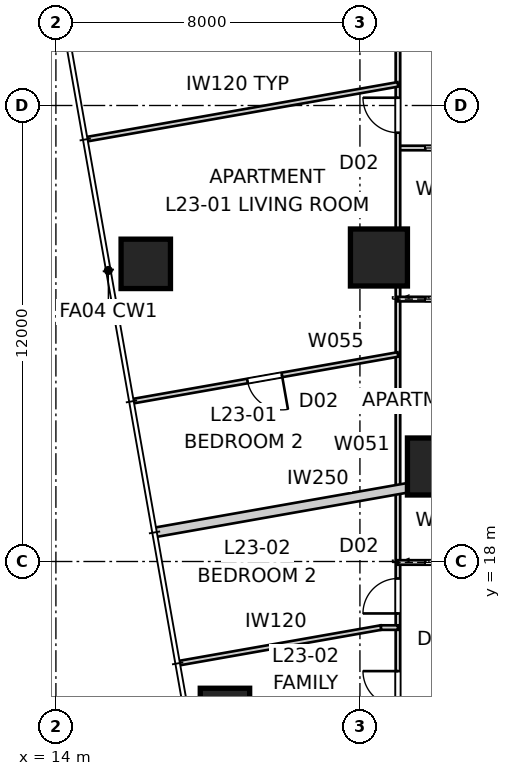
"""IFC4 building model, lengths in metres.
Left out: names, types, materials, properties, quantities, classifications, styles, units other than length and angle.
Written with IfcOpenShell. Run it as: python <this file> out.ifc"""

import sys

from ifc_helpers import new_model, si_unit, direction, frame, frame_2d, origin, origin_2d, place, context, subcontext, project, spatial, rectangle, extrude, element, fill, save


model = new_model("IFC4")
c1 = context("Model", 3, precision=1e-05, world=origin(), true_north=direction((0.0, 1.0)))
c2 = subcontext(c1, "Body", "Model", "MODEL_VIEW")
j1 = project(units=[si_unit("LENGTHUNIT", "METRE"), si_unit("PLANEANGLEUNIT", "RADIAN")], contexts=[c1])
p1 = place(None, origin())
s1 = spatial("IfcSite", under=j1, at=p1, CompositionType="ELEMENT")
p2 = place(p1, origin())
s2 = spatial("IfcBuilding", under=s1, at=p2, CompositionType="ELEMENT")
p3 = place(p2, frame((0.0, 0.0, 86.2)))
s3 = spatial("IfcBuildingStorey", under=s2, at=p3, CompositionType="ELEMENT", Elevation=86.2)
for number, where, z_axis, x_axis in (
    (1, (16.365, 25.833, 0.0), (0.0, 0.0, 1.0), (1.0, 0.0, 0.0)),
    (2, (18.448, 14.015, 0.0), (0.0, 0.0, 1.0), (1.0, 0.0, 0.0)),
):
    element("IfcColumn", number, at=place(p3, frame(where, z_axis=z_axis, x_axis=x_axis)), inside=s3, PredefinedType="COLUMN", context=c2, shape_type="SweptSolid", body=[
        extrude(rectangle(XDim=1.3, YDim=1.3, at=origin_2d()), origin(), (0.0, 0.0, 1.0), 3.4),
    ])
for number, where, z_axis, x_axis in (
    (3, (22.5, 26.0, 0.0), (0.0, 0.0, 1.0), (1.0, 0.0, 0.0)),
    (4, (24.0, 20.5, 0.0), (0.0, 0.0, 1.0), (1.0, 0.0, 0.0)),
):
    element("IfcColumn", number, at=place(p3, frame(where, z_axis=z_axis, x_axis=x_axis)), inside=s3, PredefinedType="COLUMN", context=c2, shape_type="SweptSolid", body=[
        extrude(rectangle(XDim=1.5, YDim=1.5, at=origin_2d()), origin(), (0.0, 0.0, 1.0), 3.4),
    ])
p4 = place(p3, frame((16.595, 18.765, 0.0), z_axis=(0.0, 0.0, 1.0), x_axis=(0.984806596137, 0.173654738504, 0.0)))
e5 = element("IfcWall", 5, at=p4, inside=s3, PredefinedType="PARTITIONING", context=c2, shape_type="SweptSolid", body=[
    extrude(rectangle(XDim=8.958, YDim=0.25, at=frame_2d((4.479, 0.0))), origin(), (0.0, 0.0, 1.0), 3.25),
])
p5 = place(p3, frame((25.4, 28.882, 0.0), z_axis=(0.0, 0.0, 1.0), x_axis=(-1.0, 0.0, 0.0)))
e6 = element("IfcWall", 6, at=p5, inside=s3, PredefinedType="PARTITIONING", context=c2, shape_type="SweptSolid", body=[
    extrude(rectangle(XDim=2.4, YDim=0.12, at=frame_2d((1.2, 0.0))), origin(), (0.0, 0.0, 1.0), 3.25),
])
p6 = place(p5, frame((0.72, 0.0, 0.0)))
e7 = element("IfcOpeningElement", 7, at=p6, cuts=e6, PredefinedType="OPENING", context=c2, shape_type="SweptSolid", body=[
    extrude(rectangle(XDim=0.96, YDim=2.1, at=frame_2d((0.48, 1.05))), frame((0.0, 0.07, 0.0), z_axis=(0.0, -1.0, 0.0), x_axis=(1.0, 0.0, 0.0)), (0.0, 0.0, 1.0), 0.14),
])
p7 = place(p3, frame((23.0, 13.0, 0.0), z_axis=(0.0, 0.0, 1.0), x_axis=(0.0, 1.0, 0.0)))
e8 = element("IfcWall", 8, at=p7, inside=s3, PredefinedType="PARTITIONING", context=c2, shape_type="SweptSolid", body=[
    extrude(rectangle(XDim=34.0, YDim=0.12, at=frame_2d((17.0, 0.0))), origin(), (0.0, 0.0, 1.0), 2.55),
])
p8 = place(p7, frame((18.848, 0.0, 0.0)))
e9 = element("IfcOpeningElement", 9, at=p8, cuts=e8, PredefinedType="OPENING", context=c2, shape_type="SweptSolid", body=[
    extrude(rectangle(XDim=0.92, YDim=2.34, at=frame_2d((0.46, 1.17))), frame((0.0, 0.07, 0.0), z_axis=(0.0, -1.0, 0.0), x_axis=(1.0, 0.0, 0.0)), (0.0, 0.0, 1.0), 0.14),
])
p9 = place(p7, frame((16.284, 0.0, 0.0)))
e10 = element("IfcOpeningElement", 10, at=p9, cuts=e8, PredefinedType="OPENING", context=c2, shape_type="SweptSolid", body=[
    extrude(rectangle(XDim=0.92, YDim=2.34, at=frame_2d((0.46, 1.17))), frame((0.0, 0.07, 0.0), z_axis=(0.0, -1.0, 0.0), x_axis=(1.0, 0.0, 0.0)), (0.0, 0.0, 1.0), 0.14),
])
p10 = place(p7, frame((29.052, 0.0, 0.0)))
e11 = element("IfcOpeningElement", 11, at=p10, cuts=e8, PredefinedType="OPENING", context=c2, shape_type="SweptSolid", body=[
    extrude(rectangle(XDim=0.92, YDim=2.34, at=frame_2d((0.46, 1.17))), frame((0.0, 0.07, 0.0), z_axis=(0.0, -1.0, 0.0), x_axis=(1.0, 0.0, 0.0)), (0.0, 0.0, 1.0), 0.14),
])
p11 = place(p7, frame((1.196, 0.0, 0.0)))
e12 = element("IfcOpeningElement", 12, at=p11, cuts=e8, PredefinedType="OPENING", context=c2, shape_type="SweptSolid", body=[
    extrude(rectangle(XDim=0.92, YDim=2.34, at=frame_2d((0.46, 1.17))), frame((0.0, 0.07, 0.0), z_axis=(0.0, -1.0, 0.0), x_axis=(1.0, 0.0, 0.0)), (0.0, 0.0, 1.0), 0.14),
])
p12 = place(p7, frame((3.633, 0.0, 0.0)))
e13 = element("IfcOpeningElement", 13, at=p12, cuts=e8, PredefinedType="OPENING", context=c2, shape_type="SweptSolid", body=[
    extrude(rectangle(XDim=0.92, YDim=2.34, at=frame_2d((0.46, 1.17))), frame((0.0, 0.07, 0.0), z_axis=(0.0, -1.0, 0.0), x_axis=(1.0, 0.0, 0.0)), (0.0, 0.0, 1.0), 0.14),
])
p13 = place(p7, frame((23.619, 0.0, 0.0)))
e14 = element("IfcOpeningElement", 14, at=p13, cuts=e8, PredefinedType="OPENING", context=c2, shape_type="SweptSolid", body=[
    extrude(rectangle(XDim=0.96, YDim=2.1, at=frame_2d((0.48, 1.05))), frame((0.0, 0.07, 0.0), z_axis=(0.0, -1.0, 0.0), x_axis=(1.0, 0.0, 0.0)), (0.0, 0.0, 1.0), 0.14),
])
p14 = place(p3, frame((23.0, 24.905, 0.0), z_axis=(0.0, 0.0, 1.0), x_axis=(1.0, 0.0, 0.0)))
e15 = element("IfcWall", 15, at=p14, inside=s3, PredefinedType="PARTITIONING", context=c2, shape_type="SweptSolid", body=[
    extrude(rectangle(XDim=2.4, YDim=0.12, at=frame_2d((1.2, 0.0))), origin(), (0.0, 0.0, 1.0), 3.25),
])
p15 = place(p14, frame((0.72, 0.0, 0.0)))
e16 = element("IfcOpeningElement", 16, at=p15, cuts=e15, PredefinedType="OPENING", context=c2, shape_type="SweptSolid", body=[
    extrude(rectangle(XDim=0.96, YDim=2.1, at=frame_2d((0.48, 1.05))), frame((0.0, 0.07, 0.0), z_axis=(0.0, -1.0, 0.0), x_axis=(1.0, 0.0, 0.0)), (0.0, 0.0, 1.0), 0.14),
])
p16 = place(p3, frame((14.812, 29.113, 0.0), z_axis=(0.0, 0.0, 1.0), x_axis=(0.984807787824, 0.173647980238, 0.0)))
e17 = element("IfcWall", 17, at=p16, inside=s3, PredefinedType="PARTITIONING", context=c2, shape_type="SweptSolid", body=[
    extrude(rectangle(XDim=8.315, YDim=0.12, at=frame_2d((4.157, 0.0))), origin(), (0.0, 0.0, 1.0), 3.25),
])
p17 = place(p3, frame((23.0, 23.448, 0.0), z_axis=(0.0, 0.0, 1.0), x_axis=(-0.984809234282, -0.173639776761, 0.0)))
e18 = element("IfcWall", 18, at=p17, inside=s3, PredefinedType="PARTITIONING", context=c2, shape_type="SweptSolid", body=[
    extrude(rectangle(XDim=7.081, YDim=0.12, at=frame_2d((3.541, 0.0))), origin(), (0.0, 0.0, 1.0), 3.25),
])
p18 = place(p17, frame((3.1, 0.0, 0.0)))
e19 = element("IfcOpeningElement", 19, at=p18, cuts=e18, PredefinedType="OPENING", context=c2, shape_type="SweptSolid", body=[
    extrude(rectangle(XDim=0.92, YDim=2.34, at=frame_2d((0.46, 1.17))), frame((0.0, 0.07, 0.0), z_axis=(0.0, -1.0, 0.0), x_axis=(1.0, 0.0, 0.0)), (0.0, 0.0, 1.0), 0.14),
])
p19 = place(p3, frame((23.0, 17.975, 0.0), z_axis=(0.0, 0.0, 1.0), x_axis=(1.0, 0.0, 0.0)))
e20 = element("IfcWall", 20, at=p19, inside=s3, PredefinedType="PARTITIONING", context=c2, shape_type="SweptSolid", body=[
    extrude(rectangle(XDim=2.4, YDim=0.12, at=frame_2d((1.2, 0.0))), origin(), (0.0, 0.0, 1.0), 3.25),
])
p20 = place(p19, frame((0.72, 0.0, 0.0)))
e21 = element("IfcOpeningElement", 21, at=p20, cuts=e20, PredefinedType="OPENING", context=c2, shape_type="SweptSolid", body=[
    extrude(rectangle(XDim=0.96, YDim=2.1, at=frame_2d((0.48, 1.05))), frame((0.0, 0.07, 0.0), z_axis=(0.0, -1.0, 0.0), x_axis=(1.0, 0.0, 0.0)), (0.0, 0.0, 1.0), 0.14),
])
p21 = place(p3, frame((23.0, 16.261, 0.0), z_axis=(0.0, 0.0, 1.0), x_axis=(-1.0, 0.0, 0.0)))
e22 = element("IfcWall", 22, at=p21, inside=s3, PredefinedType="PARTITIONING", context=c2, shape_type="SweptSolid", body=[
    extrude(rectangle(XDim=0.45, YDim=0.12, at=frame_2d((0.225, 0.0))), origin(), (0.0, 0.0, 1.0), 3.25),
])
p22 = place(p3, frame((22.55, 16.261, 0.0), z_axis=(0.0, 0.0, 1.0), x_axis=(-0.984810453076, -0.173632864151, 0.0)))
e23 = element("IfcWall", 23, at=p22, inside=s3, PredefinedType="PARTITIONING", context=c2, shape_type="SweptSolid", body=[
    extrude(rectangle(XDim=5.389, YDim=0.12, at=frame_2d((2.695, 0.0))), origin(), (0.0, 0.0, 1.0), 3.25),
])
p23 = place(p6, origin())
e24 = element("IfcDoor", 24, at=p23, inside=s3, OperationType="SLIDING_TO_LEFT", PredefinedType="DOOR", context=c2, shape_type="SweptSolid", body=[
    extrude(rectangle(XDim=0.96, YDim=2.1, at=frame_2d((0.48, 1.05))), frame((0.0, 0.025, 0.0), z_axis=(0.0, -1.0, 0.0), x_axis=(1.0, 0.0, 0.0)), (0.0, 0.0, 1.0), 0.05),
])
fill(e7, e24)
p24 = place(p9, origin())
e25 = element("IfcDoor", 25, at=p24, inside=s3, OperationType="SINGLE_SWING_RIGHT", PredefinedType="DOOR", context=c2, shape_type="SweptSolid", body=[
    extrude(rectangle(XDim=0.92, YDim=2.34, at=frame_2d((0.46, 1.17))), frame((0.0, 0.025, 0.0), z_axis=(0.0, -1.0, 0.0), x_axis=(1.0, 0.0, 0.0)), (0.0, 0.0, 1.0), 0.05),
])
fill(e10, e25)
p25 = place(p11, origin())
e26 = element("IfcDoor", 26, at=p25, inside=s3, OperationType="SINGLE_SWING_RIGHT", PredefinedType="DOOR", context=c2, shape_type="SweptSolid", body=[
    extrude(rectangle(XDim=0.92, YDim=2.34, at=frame_2d((0.46, 1.17))), frame((0.0, 0.025, 0.0), z_axis=(0.0, -1.0, 0.0), x_axis=(1.0, 0.0, 0.0)), (0.0, 0.0, 1.0), 0.05),
])
fill(e12, e26)
p26 = place(p20, origin())
e27 = element("IfcDoor", 27, at=p26, inside=s3, OperationType="SLIDING_TO_LEFT", PredefinedType="DOOR", context=c2, shape_type="SweptSolid", body=[
    extrude(rectangle(XDim=0.96, YDim=2.1, at=frame_2d((0.48, 1.05))), frame((0.0, 0.025, 0.0), z_axis=(0.0, -1.0, 0.0), x_axis=(1.0, 0.0, 0.0)), (0.0, 0.0, 1.0), 0.05),
])
fill(e21, e27)
p27 = place(p12, origin())
e28 = element("IfcDoor", 28, at=p27, inside=s3, OperationType="SINGLE_SWING_LEFT", PredefinedType="DOOR", context=c2, shape_type="SweptSolid", body=[
    extrude(rectangle(XDim=0.92, YDim=2.34, at=frame_2d((0.46, 1.17))), frame((0.0, 0.025, 0.0), z_axis=(0.0, -1.0, 0.0), x_axis=(1.0, 0.0, 0.0)), (0.0, 0.0, 1.0), 0.05),
])
fill(e13, e28)
p28 = place(p15, origin())
e29 = element("IfcDoor", 29, at=p28, inside=s3, OperationType="SLIDING_TO_LEFT", PredefinedType="DOOR", context=c2, shape_type="SweptSolid", body=[
    extrude(rectangle(XDim=0.96, YDim=2.1, at=frame_2d((0.48, 1.05))), frame((0.0, 0.025, 0.0), z_axis=(0.0, -1.0, 0.0), x_axis=(1.0, 0.0, 0.0)), (0.0, 0.0, 1.0), 0.05),
])
fill(e16, e29)
p29 = place(p18, origin())
e30 = element("IfcDoor", 30, at=p29, inside=s3, OperationType="SINGLE_SWING_LEFT", PredefinedType="DOOR", context=c2, shape_type="SweptSolid", body=[
    extrude(rectangle(XDim=0.92, YDim=2.34, at=frame_2d((0.46, 1.17))), frame((0.0, 0.025, 0.0), z_axis=(0.0, -1.0, 0.0), x_axis=(1.0, 0.0, 0.0)), (0.0, 0.0, 1.0), 0.05),
])
fill(e19, e30)
save(model, sys.argv[1])
